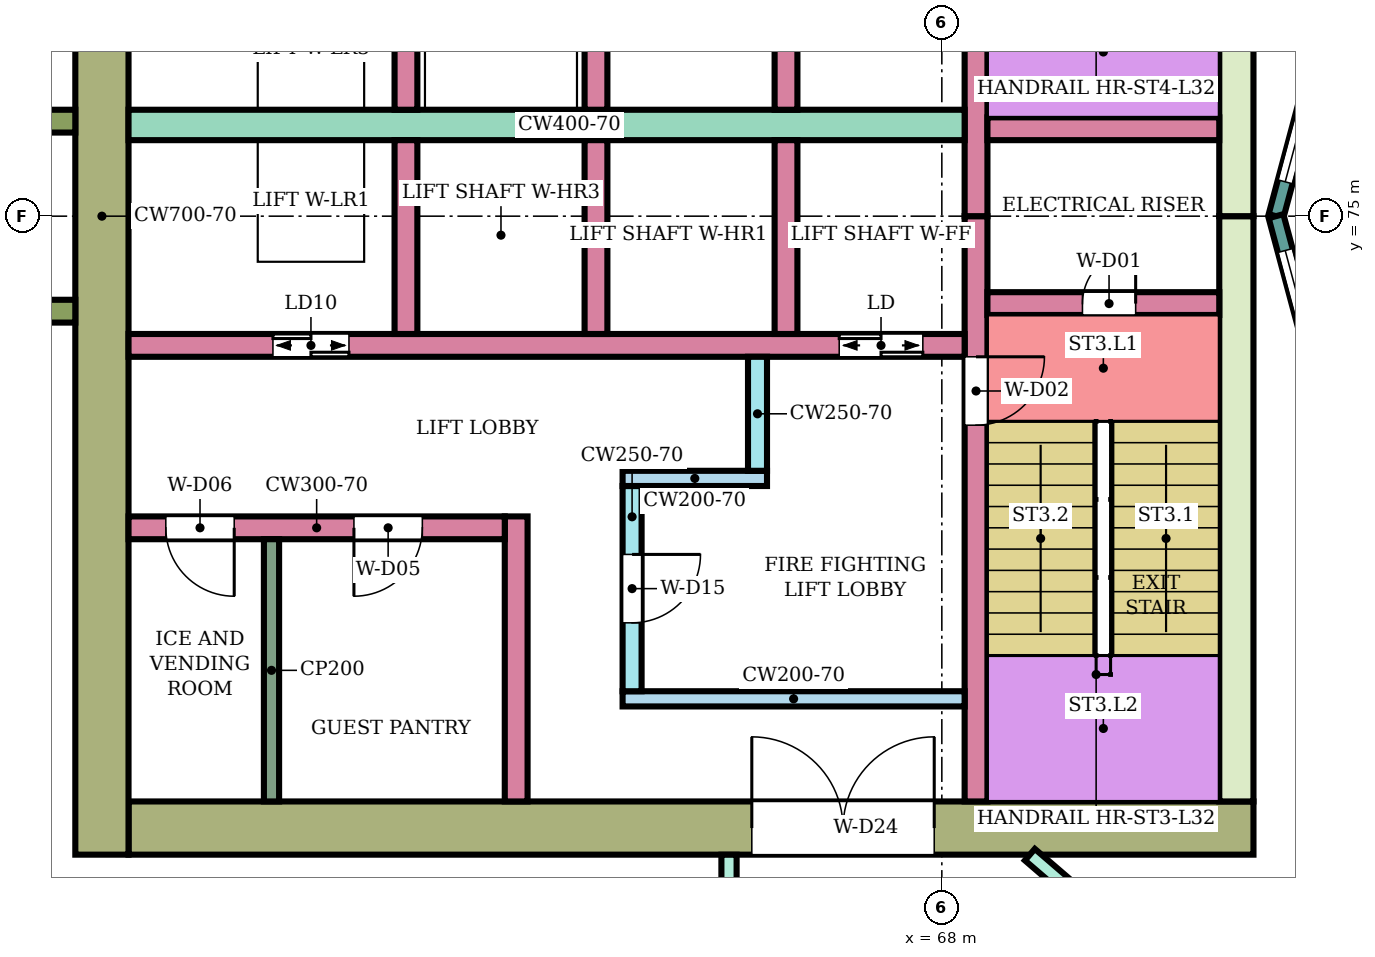
"""IFC4 building model, lengths in metres.
Left out: names, types, materials, properties, quantities, classifications, styles, units other than length and angle.
Written with IfcOpenShell. Run it as: python <this file> out.ifc"""

import sys

from ifc_helpers import new_model, si_unit, direction, frame, frame_2d, origin, place, context, subcontext, project, spatial, rectangle, extrude, element, fill, save


model = new_model("IFC4")
c1 = context("Model", 3, precision=1e-05, world=origin(), true_north=direction((0.0, 1.0)))
c2 = subcontext(c1, "Body", "Model", "MODEL_VIEW")
j1 = project(units=[si_unit("LENGTHUNIT", "METRE"), si_unit("PLANEANGLEUNIT", "RADIAN")], contexts=[c1])
p1 = place(None, origin())
s1 = spatial("IfcSite", under=j1, at=p1, CompositionType="ELEMENT")
p2 = place(p1, origin())
s2 = spatial("IfcBuilding", under=s1, at=p2, CompositionType="ELEMENT")
p3 = place(p2, frame((0.0, 0.0, 138.0)))
s3 = spatial("IfcBuildingStorey", under=s2, at=p3, CompositionType="ELEMENT", Elevation=138.0)
p4 = place(p3, frame((72.1, 66.95, 0.0), z_axis=(0.0, 0.0, 1.0), x_axis=(-1.0, 0.0, 0.0)))
e1 = element("IfcWall", 1, at=p4, inside=s3, PredefinedType="SHEAR", context=c2, shape_type="SweptSolid", body=[
    extrude(rectangle(XDim=14.8, YDim=0.7, at=frame_2d((7.4, 0.0))), origin(), (0.0, 0.0, 1.0), 3.58),
])
p5 = place(p4, frame((4.2, 0.0, 0.0)))
e2 = element("IfcOpeningElement", 2, at=p5, cuts=e1, PredefinedType="OPENING", context=c2, shape_type="SweptSolid", body=[
    extrude(rectangle(XDim=2.4, YDim=2.4, at=frame_2d((1.2, 1.2))), frame((0.0, 0.36, 0.0), z_axis=(0.0, -1.0, 0.0), x_axis=(1.0, 0.0, 0.0)), (0.0, 0.0, 1.0), 0.72),
])
for number, where, z_axis, x_axis in (
    (3, (71.875, 75.0, 0.0), (0.0, 0.0, 1.0), (0.0, -1.0, 0.0)),
    (4, (71.875, 82.7, 0.0), (0.0, 0.0, 1.0), (0.0, -1.0, 0.0)),
):
    element("IfcWall", number, at=place(p3, frame(where, z_axis=z_axis, x_axis=x_axis)), inside=s3, PredefinedType="SHEAR", context=c2, shape_type="SweptSolid", body=[
        extrude(rectangle(XDim=7.7, YDim=0.45, at=frame_2d((3.85, 0.0))), origin(), (0.0, 0.0, 1.0), 3.58),
    ])
p6 = place(p3, frame((56.95, 83.4, 0.0), z_axis=(0.0, 0.0, 1.0), x_axis=(0.0, -1.0, 0.0)))
e5 = element("IfcWall", 5, at=p6, inside=s3, PredefinedType="SHEAR", context=c2, shape_type="SweptSolid", body=[
    extrude(rectangle(XDim=16.8, YDim=0.7, at=frame_2d((8.4, 0.0))), origin(), (0.0, 0.0, 1.0), 3.58),
])
p7 = place(p3, frame((68.45, 75.0, 0.0), z_axis=(0.0, 0.0, 1.0), x_axis=(0.0, -1.0, 0.0)))
e6 = element("IfcWall", 6, at=p7, inside=s3, PredefinedType="SHEAR", context=c2, shape_type="SweptSolid", body=[
    extrude(rectangle(XDim=7.7, YDim=0.3, at=frame_2d((3.85, 0.0))), origin(), (0.0, 0.0, 1.0), 3.58),
])
p8 = place(p7, frame((1.85, 0.0, 0.0)))
e7 = element("IfcOpeningElement", 7, at=p8, cuts=e6, PredefinedType="OPENING", context=c2, shape_type="SweptSolid", body=[
    extrude(rectangle(XDim=0.9, YDim=2.1, at=frame_2d((0.45, 1.05))), frame((0.0, 0.16, 0.0), z_axis=(0.0, -1.0, 0.0), x_axis=(1.0, 0.0, 0.0)), (0.0, 0.0, 1.0), 0.32),
])
p9 = place(p3, frame((68.45, 82.7, 0.0), z_axis=(0.0, 0.0, 1.0), x_axis=(0.0, -1.0, 0.0)))
e8 = element("IfcWall", 8, at=p9, inside=s3, PredefinedType="SHEAR", context=c2, shape_type="SweptSolid", body=[
    extrude(rectangle(XDim=7.7, YDim=0.3, at=frame_2d((3.85, 0.0))), origin(), (0.0, 0.0, 1.0), 3.58),
])
p10 = place(p9, frame((0.35, 0.0, 0.0)))
e9 = element("IfcOpeningElement", 9, at=p10, cuts=e8, PredefinedType="OPENING", context=c2, shape_type="SweptSolid", body=[
    extrude(rectangle(XDim=0.9, YDim=2.1, at=frame_2d((0.45, 1.05))), frame((0.0, 0.16, 0.0), z_axis=(0.0, -1.0, 0.0), x_axis=(1.0, 0.0, 0.0)), (0.0, 0.0, 1.0), 0.32),
])
p11 = place(p3, frame((71.65, 73.85, 0.0), z_axis=(0.0, 0.0, 1.0), x_axis=(-1.0, 0.0, 0.0)))
e10 = element("IfcWall", 10, at=p11, inside=s3, PredefinedType="SHEAR", context=c2, shape_type="SweptSolid", body=[
    extrude(rectangle(XDim=3.05, YDim=0.3, at=frame_2d((1.525, 0.0))), origin(), (0.0, 0.0, 1.0), 3.58),
])
p12 = place(p11, frame((1.1, 0.0, 0.0)))
e11 = element("IfcOpeningElement", 11, at=p12, cuts=e10, PredefinedType="OPENING", context=c2, shape_type="SweptSolid", body=[
    extrude(rectangle(XDim=0.7, YDim=2.0, at=frame_2d((0.35, 1.0))), frame((0.0, 0.16, 0.0), z_axis=(0.0, -1.0, 0.0), x_axis=(1.0, 0.0, 0.0)), (0.0, 0.0, 1.0), 0.32),
])
p13 = place(p3, frame((71.65, 76.15, 0.0), z_axis=(0.0, 0.0, 1.0), x_axis=(-1.0, 0.0, 0.0)))
e12 = element("IfcWall", 12, at=p13, inside=s3, PredefinedType="SHEAR", context=c2, shape_type="SweptSolid", body=[
    extrude(rectangle(XDim=3.05, YDim=0.3, at=frame_2d((1.525, 0.0))), origin(), (0.0, 0.0, 1.0), 3.58),
])
p14 = place(p3, frame((68.3, 73.3, 0.0), z_axis=(0.0, 0.0, 1.0), x_axis=(-1.0, 0.0, 0.0)))
e13 = element("IfcWall", 13, at=p14, inside=s3, PredefinedType="SHEAR", context=c2, shape_type="SweptSolid", body=[
    extrude(rectangle(XDim=11.0, YDim=0.3, at=frame_2d((5.5, 0.0))), origin(), (0.0, 0.0, 1.0), 3.58),
])
p15 = place(p14, frame((0.55, 0.0, 0.0)))
e14 = element("IfcOpeningElement", 14, at=p15, cuts=e13, PredefinedType="OPENING", context=c2, shape_type="SweptSolid", body=[
    extrude(rectangle(XDim=1.1, YDim=2.1, at=frame_2d((0.55, 1.05))), frame((0.0, 0.16, 0.0), z_axis=(0.0, -1.0, 0.0), x_axis=(1.0, 0.0, 0.0)), (0.0, 0.0, 1.0), 0.32),
])
p16 = place(p14, frame((8.1, 0.0, 0.0)))
e15 = element("IfcOpeningElement", 15, at=p16, cuts=e13, PredefinedType="OPENING", context=c2, shape_type="SweptSolid", body=[
    extrude(rectangle(XDim=1.0, YDim=2.1, at=frame_2d((0.5, 1.05))), frame((0.0, 0.16, 0.0), z_axis=(0.0, -1.0, 0.0), x_axis=(1.0, 0.0, 0.0)), (0.0, 0.0, 1.0), 0.32),
])
p17 = place(p3, frame((68.3, 76.2, 0.0), z_axis=(0.0, 0.0, 1.0), x_axis=(-1.0, 0.0, 0.0)))
e16 = element("IfcWall", 16, at=p17, inside=s3, PredefinedType="SHEAR", context=c2, shape_type="SweptSolid", body=[
    extrude(rectangle(XDim=11.0, YDim=0.4, at=frame_2d((5.5, 0.0))), origin(), (0.0, 0.0, 1.0), 3.58),
])
for number, where, z_axis, x_axis in (
    (17, (65.95, 76.0, 0.0), (0.0, 0.0, 1.0), (0.0, -1.0, 0.0)),
    (18, (63.45, 76.0, 0.0), (0.0, 0.0, 1.0), (0.0, -1.0, 0.0)),
    (19, (60.95, 76.0, 0.0), (0.0, 0.0, 1.0), (0.0, -1.0, 0.0)),
    (20, (65.95, 78.95, 0.0), (0.0, 0.0, 1.0), (0.0, -1.0, 0.0)),
    (21, (63.45, 78.95, 0.0), (0.0, 0.0, 1.0), (0.0, -1.0, 0.0)),
    (22, (60.95, 78.95, 0.0), (0.0, 0.0, 1.0), (0.0, -1.0, 0.0)),
):
    element("IfcWall", number, at=place(p3, frame(where, z_axis=z_axis, x_axis=x_axis)), inside=s3, PredefinedType="SHEAR", context=c2, shape_type="SweptSolid", body=[
        extrude(rectangle(XDim=2.55, YDim=0.3, at=frame_2d((1.275, 0.0))), origin(), (0.0, 0.0, 1.0), 3.58),
    ])
p18 = place(p3, frame((68.3, 68.65, 0.0), z_axis=(0.0, 0.0, 1.0), x_axis=(-1.0, 0.0, 0.0)))
e23 = element("IfcWall", 23, at=p18, inside=s3, PredefinedType="SHEAR", context=c2, shape_type="SweptSolid", body=[
    extrude(rectangle(XDim=4.5, YDim=0.2, at=frame_2d((2.25, 0.0))), origin(), (0.0, 0.0, 1.0), 3.58),
])
p19 = place(p3, frame((63.925, 71.45, 0.0), z_axis=(0.0, 0.0, 1.0), x_axis=(0.0, -1.0, 0.0)))
e24 = element("IfcWall", 24, at=p19, inside=s3, PredefinedType="SHEAR", context=c2, shape_type="SweptSolid", body=[
    extrude(rectangle(XDim=2.7, YDim=0.25, at=frame_2d((1.35, 0.0))), origin(), (0.0, 0.0, 1.0), 3.58),
])
p20 = place(p19, frame((0.9, 0.0, 0.0)))
e25 = element("IfcOpeningElement", 25, at=p20, cuts=e24, PredefinedType="OPENING", context=c2, shape_type="SweptSolid", body=[
    extrude(rectangle(XDim=0.9, YDim=2.1, at=frame_2d((0.45, 1.05))), frame((0.0, 0.135, 0.0), z_axis=(0.0, -1.0, 0.0), x_axis=(1.0, 0.0, 0.0)), (0.0, 0.0, 1.0), 0.27),
])
p21 = place(p3, frame((65.7, 71.55, 0.0), z_axis=(0.0, 0.0, 1.0), x_axis=(-1.0, 0.0, 0.0)))
e26 = element("IfcWall", 26, at=p21, inside=s3, PredefinedType="SHEAR", context=c2, shape_type="SweptSolid", body=[
    extrude(rectangle(XDim=1.9, YDim=0.2, at=frame_2d((0.95, 0.0))), origin(), (0.0, 0.0, 1.0), 3.58),
])
p22 = place(p3, frame((65.575, 73.15, 0.0), z_axis=(0.0, 0.0, 1.0), x_axis=(0.0, -1.0, 0.0)))
e27 = element("IfcWall", 27, at=p22, inside=s3, PredefinedType="SHEAR", context=c2, shape_type="SweptSolid", body=[
    extrude(rectangle(XDim=1.5, YDim=0.25, at=frame_2d((0.75, 0.0))), origin(), (0.0, 0.0, 1.0), 3.58),
])
p23 = place(p3, frame((62.4, 71.05, 0.0), z_axis=(0.0, 0.0, 1.0), x_axis=(0.0, -1.0, 0.0)))
e28 = element("IfcWall", 28, at=p23, inside=s3, PredefinedType="SHEAR", context=c2, shape_type="SweptSolid", body=[
    extrude(rectangle(XDim=3.75, YDim=0.3, at=frame_2d((1.875, 0.0))), origin(), (0.0, 0.0, 1.0), 3.58),
])
p24 = place(p3, frame((62.25, 70.9, 0.0), z_axis=(0.0, 0.0, 1.0), x_axis=(-1.0, 0.0, 0.0)))
e29 = element("IfcWall", 29, at=p24, inside=s3, PredefinedType="SHEAR", context=c2, shape_type="SweptSolid", body=[
    extrude(rectangle(XDim=4.95, YDim=0.3, at=frame_2d((2.475, 0.0))), origin(), (0.0, 0.0, 1.0), 3.58),
])
p25 = place(p24, frame((1.084, 0.0, 0.0)))
e30 = element("IfcOpeningElement", 30, at=p25, cuts=e29, PredefinedType="OPENING", context=c2, shape_type="SweptSolid", body=[
    extrude(rectangle(XDim=0.9, YDim=2.1, at=frame_2d((0.45, 1.05))), frame((0.0, 0.16, 0.0), z_axis=(0.0, -1.0, 0.0), x_axis=(1.0, 0.0, 0.0)), (0.0, 0.0, 1.0), 0.32),
])
p26 = place(p24, frame((3.56, 0.0, 0.0)))
e31 = element("IfcOpeningElement", 31, at=p26, cuts=e29, PredefinedType="OPENING", context=c2, shape_type="SweptSolid", body=[
    extrude(rectangle(XDim=0.9, YDim=2.1, at=frame_2d((0.45, 1.05))), frame((0.0, 0.16, 0.0), z_axis=(0.0, -1.0, 0.0), x_axis=(1.0, 0.0, 0.0)), (0.0, 0.0, 1.0), 0.32),
])
for number, where, z_axis, x_axis in (
    (32, (56.6, 76.25, 0.0), (0.0, 0.0, 1.0), (-1.0, 0.0, 0.0)),
    (33, (56.6, 73.75, 0.0), (0.0, 0.0, 1.0), (-1.0, 0.0, 0.0)),
):
    element("IfcWall", number, at=place(p3, frame(where, z_axis=z_axis, x_axis=x_axis)), inside=s3, PredefinedType="NOTDEFINED", context=c2, shape_type="SweptSolid", body=[
        extrude(rectangle(XDim=2.416, YDim=0.3, at=frame_2d((1.208, 0.0))), origin(), (0.0, 0.0, 1.0), 3.9),
    ])
p27 = place(p3, frame((73.415, 78.802, 0.0), z_axis=(0.0, 0.0, 1.0), x_axis=(-0.258789828301, -0.965933654434, 0.0)))
e34 = element("IfcWall", 34, at=p27, inside=s3, PredefinedType="NOTDEFINED", context=c2, shape_type="SweptSolid", body=[
    extrude(rectangle(XDim=3.936, YDim=0.2, at=frame_2d((1.968, 0.0))), origin(), (0.0, 0.0, 1.0), 3.9),
])
p28 = place(p27, frame((0.468, 0.0, 0.9)))
e35 = element("IfcOpeningElement", 35, at=p28, cuts=e34, PredefinedType="OPENING", context=c2, shape_type="SweptSolid", body=[
    extrude(rectangle(XDim=3.0, YDim=2.3, at=frame_2d((1.5, 1.15))), frame((0.0, 0.11, 0.0), z_axis=(0.0, -1.0, 0.0), x_axis=(1.0, 0.0, 0.0)), (0.0, 0.0, 1.0), 0.22),
])
p29 = place(p3, frame((72.396, 75.0, 0.0), z_axis=(0.0, 0.0, 1.0), x_axis=(0.258789828301, -0.965933654434, 0.0)))
e36 = element("IfcWall", 36, at=p29, inside=s3, PredefinedType="NOTDEFINED", context=c2, shape_type="SweptSolid", body=[
    extrude(rectangle(XDim=3.936, YDim=0.2, at=frame_2d((1.968, 0.0))), origin(), (0.0, 0.0, 1.0), 3.9),
])
p30 = place(p29, frame((0.468, 0.0, 0.9)))
e37 = element("IfcOpeningElement", 37, at=p30, cuts=e36, PredefinedType="OPENING", context=c2, shape_type="SweptSolid", body=[
    extrude(rectangle(XDim=3.0, YDim=2.3, at=frame_2d((1.5, 1.15))), frame((0.0, 0.11, 0.0), z_axis=(0.0, -1.0, 0.0), x_axis=(1.0, 0.0, 0.0)), (0.0, 0.0, 1.0), 0.22),
])
p31 = place(p3, frame((65.2, 65.2, 0.0), z_axis=(0.0, 0.0, 1.0), x_axis=(0.0, 1.0, 0.0)))
e38 = element("IfcWall", 38, at=p31, inside=s3, PredefinedType="PARTITIONING", context=c2, shape_type="SweptSolid", body=[
    extrude(rectangle(XDim=1.399, YDim=0.2, at=frame_2d((0.7, 0.0))), origin(), (0.0, 0.0, 1.0), 3.45),
])
p32 = place(p3, frame((69.158, 66.6, 0.0), z_axis=(0.0, 0.0, 1.0), x_axis=(0.757976058094, -0.652282373943, 0.0)))
e39 = element("IfcWall", 39, at=p32, inside=s3, PredefinedType="PARTITIONING", context=c2, shape_type="SweptSolid", body=[
    extrude(rectangle(XDim=5.16, YDim=0.2, at=frame_2d((2.58, 0.0))), origin(), (0.0, 0.0, 1.0), 3.45),
])
p33 = place(p32, frame((1.6, 0.0, 0.0)))
e40 = element("IfcOpeningElement", 40, at=p33, cuts=e39, PredefinedType="OPENING", context=c2, shape_type="SweptSolid", body=[
    extrude(rectangle(XDim=1.0, YDim=2.1, at=frame_2d((0.5, 1.05))), frame((0.0, 0.11, 0.0), z_axis=(0.0, -1.0, 0.0), x_axis=(1.0, 0.0, 0.0)), (0.0, 0.0, 1.0), 0.22),
])
p34 = place(p3, frame((71.596, 64.635, 0.0), z_axis=(0.0, 0.0, 1.0), x_axis=(0.652285007511, 0.757973791748, 0.0)))
e41 = element("IfcWall", 41, at=p34, inside=s3, PredefinedType="PARTITIONING", context=c2, shape_type="SweptSolid", body=[
    extrude(rectangle(XDim=2.65, YDim=0.1, at=frame_2d((1.325, 0.0))), origin(), (0.0, 0.0, 1.0), 3.45),
])
p35 = place(p34, frame((0.6, 0.0, 0.0)))
e42 = element("IfcOpeningElement", 42, at=p35, cuts=e41, PredefinedType="OPENING", context=c2, shape_type="SweptSolid", body=[
    extrude(rectangle(XDim=0.8, YDim=2.1, at=frame_2d((0.4, 1.05))), frame((0.0, 0.06, 0.0), z_axis=(0.0, -1.0, 0.0), x_axis=(1.0, 0.0, 0.0)), (0.0, 0.0, 1.0), 0.12),
])
p36 = place(p3, frame((59.181, 70.75, 0.0), z_axis=(0.0, 0.0, 1.0), x_axis=(0.0, -1.0, 0.0)))
e43 = element("IfcWall", 43, at=p36, inside=s3, PredefinedType="PARTITIONING", context=c2, shape_type="SweptSolid", body=[
    extrude(rectangle(XDim=3.45, YDim=0.2, at=frame_2d((1.725, 0.0))), origin(), (0.0, 0.0, 1.0), 3.58),
])
p37 = place(p28, origin())
e44 = element("IfcWindow", 44, at=p37, inside=s3, PartitioningType="SINGLE_PANEL", PredefinedType="WINDOW", context=c2, shape_type="SweptSolid", body=[
    extrude(rectangle(XDim=3.0, YDim=2.3, at=frame_2d((1.5, 1.15))), frame((0.0, 0.03, 0.0), z_axis=(0.0, -1.0, 0.0), x_axis=(1.0, 0.0, 0.0)), (0.0, 0.0, 1.0), 0.06),
])
fill(e35, e44)
p38 = place(p30, origin())
e45 = element("IfcWindow", 45, at=p38, inside=s3, PartitioningType="SINGLE_PANEL", PredefinedType="WINDOW", context=c2, shape_type="SweptSolid", body=[
    extrude(rectangle(XDim=3.0, YDim=2.3, at=frame_2d((1.5, 1.15))), frame((0.0, 0.03, 0.0), z_axis=(0.0, -1.0, 0.0), x_axis=(1.0, 0.0, 0.0)), (0.0, 0.0, 1.0), 0.06),
])
fill(e37, e45)
p39 = place(p12, frame((0.7, 0.0, 0.0), z_axis=(0.0, 0.0, 1.0), x_axis=(-1.0, 0.0, 0.0)))
e46 = element("IfcDoor", 46, at=p39, inside=s3, OperationType="SINGLE_SWING_RIGHT", PredefinedType="DOOR", context=c2, shape_type="SweptSolid", body=[
    extrude(rectangle(XDim=0.7, YDim=2.0, at=frame_2d((0.35, 1.0))), frame((0.0, 0.025, 0.0), z_axis=(0.0, -1.0, 0.0), x_axis=(1.0, 0.0, 0.0)), (0.0, 0.0, 1.0), 0.05),
])
fill(e11, e46)
p40 = place(p8, origin())
e47 = element("IfcDoor", 47, at=p40, inside=s3, OperationType="SINGLE_SWING_LEFT", PredefinedType="DOOR", context=c2, shape_type="SweptSolid", body=[
    extrude(rectangle(XDim=0.9, YDim=2.1, at=frame_2d((0.45, 1.05))), frame((0.0, 0.025, 0.0), z_axis=(0.0, -1.0, 0.0), x_axis=(1.0, 0.0, 0.0)), (0.0, 0.0, 1.0), 0.05),
])
fill(e7, e47)
p41 = place(p15, origin())
e48 = element("IfcDoor", 48, at=p41, inside=s3, OperationType="DOUBLE_DOOR_SLIDING", PredefinedType="DOOR", context=c2, shape_type="SweptSolid", body=[
    extrude(rectangle(XDim=1.1, YDim=2.1, at=frame_2d((0.55, 1.05))), frame((0.0, 0.025, 0.0), z_axis=(0.0, -1.0, 0.0), x_axis=(1.0, 0.0, 0.0)), (0.0, 0.0, 1.0), 0.05),
])
fill(e14, e48)
p42 = place(p16, origin())
e49 = element("IfcDoor", 49, at=p42, inside=s3, OperationType="DOUBLE_DOOR_SLIDING", PredefinedType="DOOR", context=c2, shape_type="SweptSolid", body=[
    extrude(rectangle(XDim=1.0, YDim=2.1, at=frame_2d((0.5, 1.05))), frame((0.0, 0.025, 0.0), z_axis=(0.0, -1.0, 0.0), x_axis=(1.0, 0.0, 0.0)), (0.0, 0.0, 1.0), 0.05),
])
fill(e15, e49)
p43 = place(p20, origin())
e50 = element("IfcDoor", 50, at=p43, inside=s3, OperationType="SINGLE_SWING_LEFT", PredefinedType="DOOR", context=c2, shape_type="SweptSolid", body=[
    extrude(rectangle(XDim=0.9, YDim=2.1, at=frame_2d((0.45, 1.05))), frame((0.0, 0.025, 0.0), z_axis=(0.0, -1.0, 0.0), x_axis=(1.0, 0.0, 0.0)), (0.0, 0.0, 1.0), 0.05),
])
fill(e25, e50)
p44 = place(p25, origin())
e51 = element("IfcDoor", 51, at=p44, inside=s3, OperationType="SINGLE_SWING_RIGHT", PredefinedType="DOOR", context=c2, shape_type="SweptSolid", body=[
    extrude(rectangle(XDim=0.9, YDim=2.1, at=frame_2d((0.45, 1.05))), frame((0.0, 0.025, 0.0), z_axis=(0.0, -1.0, 0.0), x_axis=(1.0, 0.0, 0.0)), (0.0, 0.0, 1.0), 0.05),
])
fill(e30, e51)
p45 = place(p26, origin())
e52 = element("IfcDoor", 52, at=p45, inside=s3, OperationType="SINGLE_SWING_LEFT", PredefinedType="DOOR", context=c2, shape_type="SweptSolid", body=[
    extrude(rectangle(XDim=0.9, YDim=2.1, at=frame_2d((0.45, 1.05))), frame((0.0, 0.025, 0.0), z_axis=(0.0, -1.0, 0.0), x_axis=(1.0, 0.0, 0.0)), (0.0, 0.0, 1.0), 0.05),
])
fill(e31, e52)
p46 = place(p5, frame((2.4, 0.0, 0.0), z_axis=(0.0, 0.0, 1.0), x_axis=(-1.0, 0.0, 0.0)))
e53 = element("IfcDoor", 53, at=p46, inside=s3, OperationType="DOUBLE_DOOR_SINGLE_SWING", PredefinedType="DOOR", context=c2, shape_type="SweptSolid", body=[
    extrude(rectangle(XDim=2.4, YDim=2.4, at=frame_2d((1.2, 1.2))), frame((0.0, 0.025, 0.0), z_axis=(0.0, -1.0, 0.0), x_axis=(1.0, 0.0, 0.0)), (0.0, 0.0, 1.0), 0.05),
])
fill(e2, e53)
save(model, sys.argv[1])
